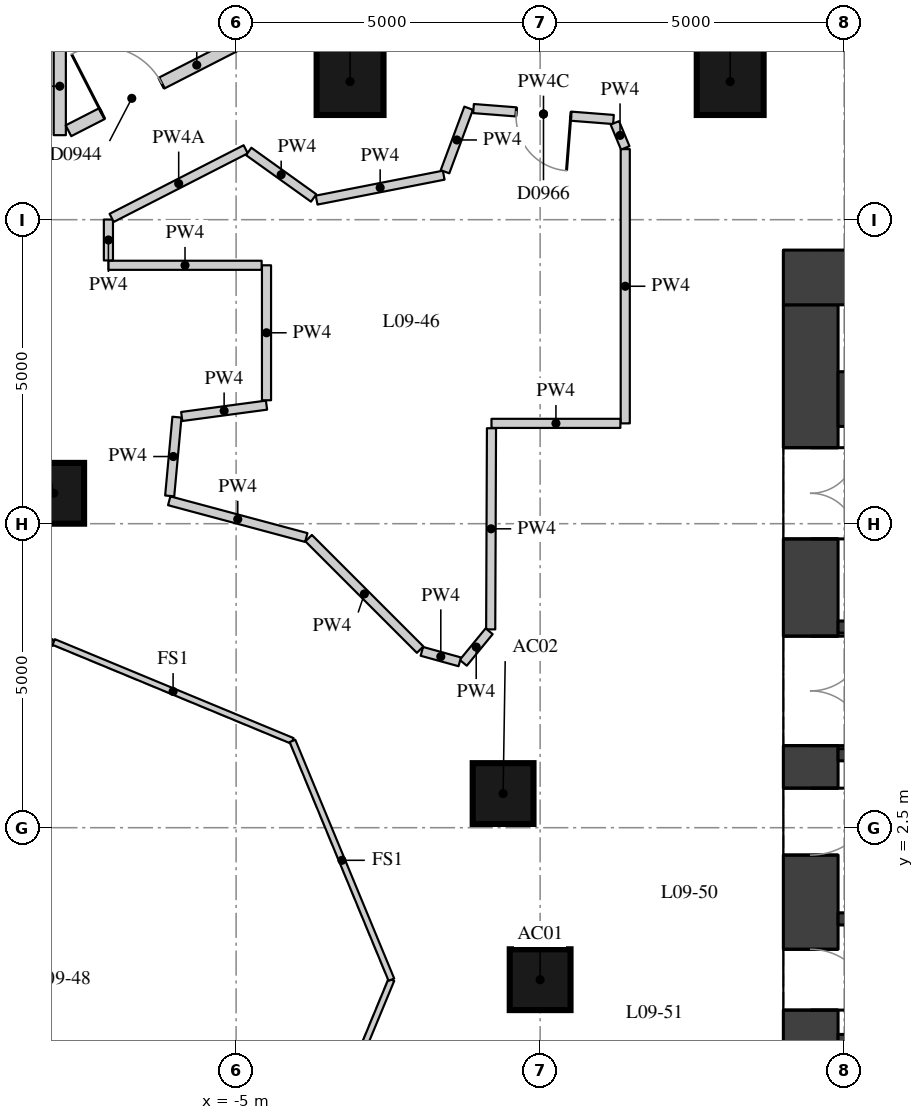
"""IFC4 building model, lengths in metres.
Left out: names, types, materials, properties, quantities, classifications, styles, units other than length and angle.
Written with IfcOpenShell. Run it as: python <this file> out.ifc"""

import sys

from ifc_helpers import new_model, si_unit, direction, frame, frame_2d, origin, origin_2d, place, context, subcontext, project, spatial, rectangle, extrude, element, fill, save


model = new_model("IFC4")
c1 = context("Model", 3, precision=1e-05, world=origin(), true_north=direction((0.0, 1.0)))
c2 = subcontext(c1, "Body", "Model", "MODEL_VIEW")
j1 = project(units=[si_unit("LENGTHUNIT", "METRE"), si_unit("PLANEANGLEUNIT", "RADIAN")], contexts=[c1])
p1 = place(None, origin())
s1 = spatial("IfcSite", under=j1, at=p1, CompositionType="ELEMENT")
p2 = place(p1, origin())
s2 = spatial("IfcBuilding", under=s1, at=p2, CompositionType="ELEMENT")
p3 = place(p2, frame((0.0, 0.0, 38.2)))
s3 = spatial("IfcBuildingStorey", under=s2, at=p3, CompositionType="ELEMENT", Elevation=38.2)
for number, where, z_axis, x_axis in (
    (1, (0.0, 0.0, 0.0), (0.0, 0.0, 1.0), (1.0, 0.0, 0.0)),
    (2, (-0.609, 3.062, 0.0), (0.0, 0.0, 1.0), (1.0, 0.0, 0.0)),
    (3, (-8.0, 8.0, 0.0), (0.0, 0.0, 1.0), (1.0, 0.0, 0.0)),
):
    element("IfcColumn", number, at=place(p3, frame(where, z_axis=z_axis, x_axis=x_axis)), inside=s3, PredefinedType="COLUMN", context=c2, shape_type="SweptSolid", body=[
        extrude(rectangle(XDim=1.0, YDim=1.0, at=origin_2d()), origin(), (0.0, 0.0, 1.0), 3.3),
    ])
for number, where, z_axis, x_axis in (
    (4, (3.126, 14.772, 0.0), (0.0, 0.0, 1.0), (1.0, 0.0, 0.0)),
    (5, (-3.126, 14.772, 0.0), (0.0, 0.0, 1.0), (1.0, 0.0, 0.0)),
):
    element("IfcColumn", number, at=place(p3, frame(where, z_axis=z_axis, x_axis=x_axis)), inside=s3, PredefinedType="COLUMN", context=c2, shape_type="SweptSolid", body=[
        extrude(rectangle(XDim=1.1, YDim=1.1, at=origin_2d()), origin(), (0.0, 0.0, 1.0), 3.3),
    ])
p4 = place(p3, frame((4.45, -11.1, 0.0), z_axis=(0.0, 0.0, 1.0), x_axis=(0.0, 1.0, 0.0)))
e6 = element("IfcWall", 6, at=p4, inside=s3, PredefinedType="SHEAR", context=c2, shape_type="SweptSolid", body=[
    extrude(rectangle(XDim=22.2, YDim=0.9, at=frame_2d((11.1, 0.0))), origin(), (0.0, 0.0, 1.0), 3.02),
])
p5 = place(p4, frame((2.35, 0.0, 0.0)))
e7 = element("IfcOpeningElement", 7, at=p5, cuts=e6, PredefinedType="OPENING", context=c2, shape_type="SweptSolid", body=[
    extrude(rectangle(XDim=1.5, YDim=2.1, at=frame_2d((0.75, 1.05))), frame((0.0, 0.46, 0.0), z_axis=(0.0, -1.0, 0.0), x_axis=(1.0, 0.0, 0.0)), (0.0, 0.0, 1.0), 0.92),
])
p6 = place(p4, frame((5.45, 0.0, 0.0)))
e8 = element("IfcOpeningElement", 8, at=p6, cuts=e6, PredefinedType="OPENING", context=c2, shape_type="SweptSolid", body=[
    extrude(rectangle(XDim=1.8, YDim=2.1, at=frame_2d((0.9, 1.05))), frame((0.0, 0.46, 0.0), z_axis=(0.0, -1.0, 0.0), x_axis=(1.0, 0.0, 0.0)), (0.0, 0.0, 1.0), 0.92),
])
p7 = place(p4, frame((7.95, 0.0, 0.0)))
e9 = element("IfcOpeningElement", 9, at=p7, cuts=e6, PredefinedType="OPENING", context=c2, shape_type="SweptSolid", body=[
    extrude(rectangle(XDim=1.1, YDim=2.1, at=frame_2d((0.55, 1.05))), frame((0.0, 0.46, 0.0), z_axis=(0.0, -1.0, 0.0), x_axis=(1.0, 0.0, 0.0)), (0.0, 0.0, 1.0), 0.92),
])
p8 = place(p4, frame((10.6, 0.0, 0.0)))
e10 = element("IfcOpeningElement", 10, at=p8, cuts=e6, PredefinedType="OPENING", context=c2, shape_type="SweptSolid", body=[
    extrude(rectangle(XDim=1.0, YDim=2.1, at=frame_2d((0.5, 1.05))), frame((0.0, 0.46, 0.0), z_axis=(0.0, -1.0, 0.0), x_axis=(1.0, 0.0, 0.0)), (0.0, 0.0, 1.0), 0.92),
])
p9 = place(p4, frame((13.15, 0.0, 0.0)))
e11 = element("IfcOpeningElement", 11, at=p9, cuts=e6, PredefinedType="OPENING", context=c2, shape_type="SweptSolid", body=[
    extrude(rectangle(XDim=1.1, YDim=2.1, at=frame_2d((0.55, 1.05))), frame((0.0, 0.46, 0.0), z_axis=(0.0, -1.0, 0.0), x_axis=(1.0, 0.0, 0.0)), (0.0, 0.0, 1.0), 0.92),
])
p10 = place(p4, frame((14.95, 0.0, 0.0)))
e12 = element("IfcOpeningElement", 12, at=p10, cuts=e6, PredefinedType="OPENING", context=c2, shape_type="SweptSolid", body=[
    extrude(rectangle(XDim=1.8, YDim=2.1, at=frame_2d((0.9, 1.05))), frame((0.0, 0.46, 0.0), z_axis=(0.0, -1.0, 0.0), x_axis=(1.0, 0.0, 0.0)), (0.0, 0.0, 1.0), 0.92),
])
p11 = place(p4, frame((18.35, 0.0, 0.0)))
e13 = element("IfcOpeningElement", 13, at=p11, cuts=e6, PredefinedType="OPENING", context=c2, shape_type="SweptSolid", body=[
    extrude(rectangle(XDim=1.5, YDim=2.1, at=frame_2d((0.75, 1.05))), frame((0.0, 0.46, 0.0), z_axis=(0.0, -1.0, 0.0), x_axis=(1.0, 0.0, 0.0)), (0.0, 0.0, 1.0), 0.92),
])
p12 = place(p3, frame((4.0, 11.55, 0.0), z_axis=(0.0, 0.0, 1.0), x_axis=(1.0, 0.0, 0.0)))
e14 = element("IfcWall", 14, at=p12, inside=s3, PredefinedType="SHEAR", context=c2, shape_type="SweptSolid", body=[
    extrude(rectangle(XDim=15.2, YDim=0.9, at=frame_2d((7.6, 0.0))), origin(), (0.0, 0.0, 1.0), 3.02),
])
p13 = place(p3, frame((4.9, 9.55, 0.0), z_axis=(0.0, 0.0, 1.0), x_axis=(1.0, 0.0, 0.0)))
e15 = element("IfcWall", 15, at=p13, inside=s3, PredefinedType="SHEAR", context=c2, shape_type="SweptSolid", body=[
    extrude(rectangle(XDim=10.2, YDim=0.9, at=frame_2d((5.1, 0.0))), origin(), (0.0, 0.0, 1.0), 3.02),
])
p14 = place(p3, frame((4.9, 5.8, 0.0), z_axis=(0.0, 0.0, 1.0), x_axis=(1.0, 0.0, 0.0)))
e16 = element("IfcWall", 16, at=p14, inside=s3, PredefinedType="SHEAR", context=c2, shape_type="SweptSolid", body=[
    extrude(rectangle(XDim=10.2, YDim=0.2, at=frame_2d((5.1, 0.0))), origin(), (0.0, 0.0, 1.0), 3.02),
])
p15 = place(p14, frame((6.75, 0.0, 0.0)))
e17 = element("IfcOpeningElement", 17, at=p15, cuts=e16, PredefinedType="OPENING", context=c2, shape_type="SweptSolid", body=[
    extrude(rectangle(XDim=1.1, YDim=2.1, at=frame_2d((0.55, 1.05))), frame((0.0, 0.11, 0.0), z_axis=(0.0, -1.0, 0.0), x_axis=(1.0, 0.0, 0.0)), (0.0, 0.0, 1.0), 0.22),
])
p16 = place(p14, frame((8.75, 0.0, 0.0)))
e18 = element("IfcOpeningElement", 18, at=p16, cuts=e16, PredefinedType="OPENING", context=c2, shape_type="SweptSolid", body=[
    extrude(rectangle(XDim=1.1, YDim=2.1, at=frame_2d((0.55, 1.05))), frame((0.0, 0.11, 0.0), z_axis=(0.0, -1.0, 0.0), x_axis=(1.0, 0.0, 0.0)), (0.0, 0.0, 1.0), 0.22),
])
p17 = place(p3, frame((4.9, 3.7, 0.0), z_axis=(0.0, 0.0, 1.0), x_axis=(1.0, 0.0, 0.0)))
e19 = element("IfcWall", 19, at=p17, inside=s3, PredefinedType="SHEAR", context=c2, shape_type="SweptSolid", body=[
    extrude(rectangle(XDim=10.2, YDim=0.2, at=frame_2d((5.1, 0.0))), origin(), (0.0, 0.0, 1.0), 3.02),
])
p18 = place(p17, frame((6.3, 0.0, 0.0)))
e20 = element("IfcOpeningElement", 20, at=p18, cuts=e19, PredefinedType="OPENING", context=c2, shape_type="SweptSolid", body=[
    extrude(rectangle(XDim=1.1, YDim=2.1, at=frame_2d((0.55, 1.05))), frame((0.0, 0.11, 0.0), z_axis=(0.0, -1.0, 0.0), x_axis=(1.0, 0.0, 0.0)), (0.0, 0.0, 1.0), 0.22),
])
p19 = place(p17, frame((8.6, 0.0, 0.0)))
e21 = element("IfcOpeningElement", 21, at=p19, cuts=e19, PredefinedType="OPENING", context=c2, shape_type="SweptSolid", body=[
    extrude(rectangle(XDim=1.1, YDim=2.1, at=frame_2d((0.55, 1.05))), frame((0.0, 0.11, 0.0), z_axis=(0.0, -1.0, 0.0), x_axis=(1.0, 0.0, 0.0)), (0.0, 0.0, 1.0), 0.22),
])
for number, where, z_axis, x_axis in (
    (22, (4.9, 1.0, 0.0), (0.0, 0.0, 1.0), (1.0, 0.0, 0.0)),
    (23, (4.9, -1.0, 0.0), (0.0, 0.0, 1.0), (1.0, 0.0, 0.0)),
):
    element("IfcWall", number, at=place(p3, frame(where, z_axis=z_axis, x_axis=x_axis)), inside=s3, PredefinedType="SHEAR", context=c2, shape_type="SweptSolid", body=[
        extrude(rectangle(XDim=10.2, YDim=0.2, at=frame_2d((5.1, 0.0))), origin(), (0.0, 0.0, 1.0), 3.02),
    ])
p20 = place(p3, frame((-7.9, 15.5, 0.0), z_axis=(0.0, 0.0, 1.0), x_axis=(0.0, -1.0, 0.0)))
e24 = element("IfcWall", 24, at=p20, inside=s3, PredefinedType="PARTITIONING", context=c2, shape_type="SweptSolid", body=[
    extrude(rectangle(XDim=1.61, YDim=0.2, at=frame_2d((0.805, 0.0))), origin(), (0.0, 0.0, 1.0), 3.02),
])
p21 = place(p3, frame((-7.757, 13.963, 0.0), z_axis=(0.0, 0.0, 1.0), x_axis=(0.89017531408, 0.455618162722, 0.0)))
e25 = element("IfcWall", 25, at=p21, inside=s3, PredefinedType="PARTITIONING", context=c2, shape_type="SweptSolid", body=[
    extrude(rectangle(XDim=4.741, YDim=0.2, at=frame_2d((2.371, 0.0))), origin(), (0.0, 0.0, 1.0), 2.57),
])
p22 = place(p21, frame((0.62, 0.0, 0.0)))
e26 = element("IfcOpeningElement", 26, at=p22, cuts=e25, PredefinedType="OPENING", context=c2, shape_type="SweptSolid", body=[
    extrude(rectangle(XDim=1.1, YDim=2.1, at=frame_2d((0.55, 1.05))), frame((0.0, 0.11, 0.0), z_axis=(0.0, -1.0, 0.0), x_axis=(1.0, 0.0, 0.0)), (0.0, 0.0, 1.0), 0.22),
])
p23 = place(p3, frame((-3.477, 16.118, 0.0), z_axis=(0.0, 0.0, 1.0), x_axis=(0.996970328684, -0.077782798383, 0.0)))
e27 = element("IfcWall", 27, at=p23, inside=s3, PredefinedType="PARTITIONING", context=c2, shape_type="SweptSolid", body=[
    extrude(rectangle(XDim=10.449, YDim=0.2, at=frame_2d((5.225, 0.0))), origin(), (0.0, 0.0, 1.0), 3.02),
])
p24 = place(p23, frame((2.372, 0.0, 0.0)))
e28 = element("IfcOpeningElement", 28, at=p24, cuts=e27, PredefinedType="OPENING", context=c2, shape_type="SweptSolid", body=[
    extrude(rectangle(XDim=1.1, YDim=2.1, at=frame_2d((0.55, 1.05))), frame((0.0, 0.11, 0.0), z_axis=(0.0, -1.0, 0.0), x_axis=(1.0, 0.0, 0.0)), (0.0, 0.0, 1.0), 0.22),
])
p25 = place(p3, frame((-3.676, 12.822, 0.0), z_axis=(0.0, 0.0, 1.0), x_axis=(0.981284032016, 0.192565958858, 0.0)))
e29 = element("IfcWall", 29, at=p25, inside=s3, PredefinedType="PARTITIONING", context=c2, shape_type="SweptSolid", body=[
    extrude(rectangle(XDim=2.13, YDim=0.15, at=frame_2d((1.065, 0.0))), origin(), (0.0, 0.0, 1.0), 3.02),
])
p26 = place(p3, frame((-1.564, 13.289, 0.0), z_axis=(0.0, 0.0, 1.0), x_axis=(0.348554808131, 0.937288400509, 0.0)))
e30 = element("IfcWall", 30, at=p26, inside=s3, PredefinedType="PARTITIONING", context=c2, shape_type="SweptSolid", body=[
    extrude(rectangle(XDim=1.115, YDim=0.15, at=frame_2d((0.558, 0.0))), origin(), (0.0, 0.0, 1.0), 3.02),
])
p27 = place(p3, frame((-1.096, 14.328, 0.0), z_axis=(0.0, 0.0, 1.0), x_axis=(0.996959190057, -0.077925434624, 0.0)))
e31 = element("IfcWall", 31, at=p27, inside=s3, PredefinedType="PARTITIONING", context=c2, shape_type="SweptSolid", body=[
    extrude(rectangle(XDim=2.309, YDim=0.15, at=frame_2d((1.155, 0.0))), origin(), (0.0, 0.0, 1.0), 2.42),
])
p28 = place(p27, frame((0.705, 0.0, 0.0)))
e32 = element("IfcOpeningElement", 32, at=p28, cuts=e31, PredefinedType="OPENING", context=c2, shape_type="SweptSolid", body=[
    extrude(rectangle(XDim=0.9, YDim=2.1, at=frame_2d((0.45, 1.05))), frame((0.0, 0.085, 0.0), z_axis=(0.0, -1.0, 0.0), x_axis=(1.0, 0.0, 0.0)), (0.0, 0.0, 1.0), 0.17),
])
p29 = place(p3, frame((1.229, 14.092, 0.0), z_axis=(0.0, 0.0, 1.0), x_axis=(0.38344820197, -0.923562383603, 0.0)))
e33 = element("IfcWall", 33, at=p29, inside=s3, PredefinedType="PARTITIONING", context=c2, shape_type="SweptSolid", body=[
    extrude(rectangle(XDim=0.446, YDim=0.15, at=frame_2d((0.223, 0.0))), origin(), (0.0, 0.0, 1.0), 3.02),
])
p30 = place(p3, frame((1.4, 13.661, 0.0), z_axis=(0.0, 0.0, 1.0), x_axis=(0.0, -1.0, 0.0)))
e34 = element("IfcWall", 34, at=p30, inside=s3, PredefinedType="PARTITIONING", context=c2, shape_type="SweptSolid", body=[
    extrude(rectangle(XDim=4.511, YDim=0.15, at=frame_2d((2.255, 0.0))), origin(), (0.0, 0.0, 1.0), 3.02),
])
p31 = place(p3, frame((1.32, 9.15, 0.0), z_axis=(0.0, 0.0, 1.0), x_axis=(-1.0, 0.0, 0.0)))
e35 = element("IfcWall", 35, at=p31, inside=s3, PredefinedType="PARTITIONING", context=c2, shape_type="SweptSolid", body=[
    extrude(rectangle(XDim=2.12, YDim=0.15, at=frame_2d((1.06, 0.0))), origin(), (0.0, 0.0, 1.0), 3.02),
])
p32 = place(p3, frame((-0.8, 9.07, 0.0), z_axis=(0.0, 0.0, 1.0), x_axis=(-0.003911409193, -0.99999235041, 0.0)))
e36 = element("IfcWall", 36, at=p32, inside=s3, PredefinedType="PARTITIONING", context=c2, shape_type="SweptSolid", body=[
    extrude(rectangle(XDim=3.308, YDim=0.15, at=frame_2d((1.654, 0.0))), origin(), (0.0, 0.0, 1.0), 3.02),
])
p33 = place(p3, frame((-0.838, 5.731, 0.0), z_axis=(0.0, 0.0, 1.0), x_axis=(-0.634227442266, -0.773146526524, 0.0)))
e37 = element("IfcWall", 37, at=p33, inside=s3, PredefinedType="PARTITIONING", context=c2, shape_type="SweptSolid", body=[
    extrude(rectangle(XDim=0.671, YDim=0.15, at=frame_2d((0.336, 0.0))), origin(), (0.0, 0.0, 1.0), 3.02),
])
p34 = place(p3, frame((-1.322, 5.228, 0.0), z_axis=(0.0, 0.0, 1.0), x_axis=(-0.963895729021, 0.266279972163, 0.0)))
e38 = element("IfcWall", 38, at=p34, inside=s3, PredefinedType="PARTITIONING", context=c2, shape_type="SweptSolid", body=[
    extrude(rectangle(XDim=0.646, YDim=0.15, at=frame_2d((0.323, 0.0))), origin(), (0.0, 0.0, 1.0), 3.02),
])
p35 = place(p3, frame((-1.973, 5.428, 0.0), z_axis=(0.0, 0.0, 1.0), x_axis=(-0.707106781187, 0.707106781187, 0.0)))
e39 = element("IfcWall", 39, at=p35, inside=s3, PredefinedType="PARTITIONING", context=c2, shape_type="SweptSolid", body=[
    extrude(rectangle(XDim=2.593, YDim=0.15, at=frame_2d((1.297, 0.0))), origin(), (0.0, 0.0, 1.0), 3.02),
])
p36 = place(p3, frame((-3.846, 7.272, 0.0), z_axis=(0.0, 0.0, 1.0), x_axis=(-0.965906023197, 0.258892939941, 0.0)))
e40 = element("IfcWall", 40, at=p36, inside=s3, PredefinedType="PARTITIONING", context=c2, shape_type="SweptSolid", body=[
    extrude(rectangle(XDim=2.334, YDim=0.15, at=frame_2d((1.167, 0.0))), origin(), (0.0, 0.0, 1.0), 3.02),
])
p37 = place(p3, frame((-6.092, 7.957, 0.0), z_axis=(0.0, 0.0, 1.0), x_axis=(0.091567710563, 0.99579885237, 0.0)))
e41 = element("IfcWall", 41, at=p37, inside=s3, PredefinedType="PARTITIONING", context=c2, shape_type="SweptSolid", body=[
    extrude(rectangle(XDim=1.301, YDim=0.15, at=frame_2d((0.65, 0.0))), origin(), (0.0, 0.0, 1.0), 3.02),
])
p38 = place(p3, frame((-5.894, 9.263, 0.0), z_axis=(0.0, 0.0, 1.0), x_axis=(0.991144324173, 0.132789038177, 0.0)))
e42 = element("IfcWall", 42, at=p38, inside=s3, PredefinedType="PARTITIONING", context=c2, shape_type="SweptSolid", body=[
    extrude(rectangle(XDim=1.406, YDim=0.15, at=frame_2d((0.703, 0.0))), origin(), (0.0, 0.0, 1.0), 3.02),
])
p39 = place(p3, frame((-4.5, 9.53, 0.0), z_axis=(0.0, 0.0, 1.0), x_axis=(0.0, 1.0, 0.0)))
e43 = element("IfcWall", 43, at=p39, inside=s3, PredefinedType="PARTITIONING", context=c2, shape_type="SweptSolid", body=[
    extrude(rectangle(XDim=2.22, YDim=0.15, at=frame_2d((1.11, 0.0))), origin(), (0.0, 0.0, 1.0), 3.02),
])
p40 = place(p3, frame((-4.58, 11.75, 0.0), z_axis=(0.0, 0.0, 1.0), x_axis=(-1.0, 0.0, 0.0)))
e44 = element("IfcWall", 44, at=p40, inside=s3, PredefinedType="PARTITIONING", context=c2, shape_type="SweptSolid", body=[
    extrude(rectangle(XDim=2.52, YDim=0.15, at=frame_2d((1.26, 0.0))), origin(), (0.0, 0.0, 1.0), 3.02),
])
p41 = place(p3, frame((-7.1, 11.83, 0.0), z_axis=(0.0, 0.0, 1.0), x_axis=(0.0, 1.0, 0.0)))
e45 = element("IfcWall", 45, at=p41, inside=s3, PredefinedType="PARTITIONING", context=c2, shape_type="SweptSolid", body=[
    extrude(rectangle(XDim=0.672, YDim=0.15, at=frame_2d((0.336, 0.0))), origin(), (0.0, 0.0, 1.0), 3.02),
])
p42 = place(p3, frame((-7.047, 12.53, 0.0), z_axis=(0.0, 0.0, 1.0), x_axis=(0.890208185307, 0.455553934032, 0.0)))
e46 = element("IfcWall", 46, at=p42, inside=s3, PredefinedType="PARTITIONING", context=c2, shape_type="SweptSolid", body=[
    extrude(rectangle(XDim=2.477, YDim=0.15, at=frame_2d((1.238, 0.0))), origin(), (0.0, 0.0, 1.0), 2.57),
])
p43 = place(p3, frame((-4.793, 13.623, 0.0), z_axis=(0.0, 0.0, 1.0), x_axis=(0.812853780358, -0.582467794611, 0.0)))
e47 = element("IfcWall", 47, at=p43, inside=s3, PredefinedType="PARTITIONING", context=c2, shape_type="SweptSolid", body=[
    extrude(rectangle(XDim=1.314, YDim=0.15, at=frame_2d((0.657, 0.0))), origin(), (0.0, 0.0, 1.0), 3.02),
])
for number, where, z_axis, x_axis in (
    (48, (-2.446, 0.0, 0.0), (0.0, 0.0, 1.0), (-0.383, -0.924, 0.0)),
    (49, (-11.927, 3.927, 0.0), (0.0, 0.0, 1.0), (0.924, 0.383, 0.0)),
    (50, (-8.0, 5.554, 0.0), (0.0, 0.0, 1.0), (0.924, -0.383, 0.0)),
    (51, (-4.073, 3.927, 0.0), (0.0, 0.0, 1.0), (0.383, -0.924, 0.0)),
):
    element("IfcWall", number, at=place(p3, frame(where, z_axis=z_axis, x_axis=x_axis)), inside=s3, PredefinedType="PARTITIONING", context=c2, shape_type="SweptSolid", body=[
        extrude(rectangle(XDim=4.251, YDim=0.1, at=frame_2d((2.125, 0.0))), origin(), (0.0, 0.0, 1.0), 3.02),
    ])
p44 = place(p8, origin())
e52 = element("IfcDoor", 52, at=p44, inside=s3, OperationType="SINGLE_SWING_RIGHT", PredefinedType="DOOR", context=c2, shape_type="SweptSolid", body=[
    extrude(rectangle(XDim=1.0, YDim=2.1, at=frame_2d((0.5, 1.05))), frame((0.0, 0.025, 0.0), z_axis=(0.0, -1.0, 0.0), x_axis=(1.0, 0.0, 0.0)), (0.0, 0.0, 1.0), 0.05),
])
fill(e10, e52)
p45 = place(p9, origin())
e53 = element("IfcDoor", 53, at=p45, inside=s3, OperationType="SINGLE_SWING_LEFT", PredefinedType="DOOR", context=c2, shape_type="SweptSolid", body=[
    extrude(rectangle(XDim=1.1, YDim=2.1, at=frame_2d((0.55, 1.05))), frame((0.0, 0.025, 0.0), z_axis=(0.0, -1.0, 0.0), x_axis=(1.0, 0.0, 0.0)), (0.0, 0.0, 1.0), 0.05),
])
fill(e11, e53)
p46 = place(p10, origin())
e54 = element("IfcDoor", 54, at=p46, inside=s3, OperationType="DOUBLE_DOOR_SINGLE_SWING", PredefinedType="DOOR", context=c2, shape_type="SweptSolid", body=[
    extrude(rectangle(XDim=1.8, YDim=2.1, at=frame_2d((0.9, 1.05))), frame((0.0, 0.025, 0.0), z_axis=(0.0, -1.0, 0.0), x_axis=(1.0, 0.0, 0.0)), (0.0, 0.0, 1.0), 0.05),
])
fill(e12, e54)
p47 = place(p11, origin())
e55 = element("IfcDoor", 55, at=p47, inside=s3, OperationType="DOUBLE_DOOR_SINGLE_SWING", PredefinedType="DOOR", context=c2, shape_type="SweptSolid", body=[
    extrude(rectangle(XDim=1.5, YDim=2.1, at=frame_2d((0.75, 1.05))), frame((0.0, 0.025, 0.0), z_axis=(0.0, -1.0, 0.0), x_axis=(1.0, 0.0, 0.0)), (0.0, 0.0, 1.0), 0.05),
])
fill(e13, e55)
p48 = place(p22, origin())
e56 = element("IfcDoor", 56, at=p48, inside=s3, OperationType="SINGLE_SWING_LEFT", PredefinedType="DOOR", context=c2, shape_type="SweptSolid", body=[
    extrude(rectangle(XDim=1.1, YDim=2.1, at=frame_2d((0.55, 1.05))), frame((0.0, 0.025, 0.0), z_axis=(0.0, -1.0, 0.0), x_axis=(1.0, 0.0, 0.0)), (0.0, 0.0, 1.0), 0.05),
])
fill(e26, e56)
p49 = place(p28, origin())
e57 = element("IfcDoor", 57, at=p49, inside=s3, OperationType="SINGLE_SWING_LEFT", PredefinedType="DOOR", context=c2, shape_type="SweptSolid", body=[
    extrude(rectangle(XDim=0.9, YDim=2.1, at=frame_2d((0.45, 1.05))), frame((0.0, 0.025, 0.0), z_axis=(0.0, -1.0, 0.0), x_axis=(1.0, 0.0, 0.0)), (0.0, 0.0, 1.0), 0.05),
])
fill(e32, e57)
save(model, sys.argv[1])
